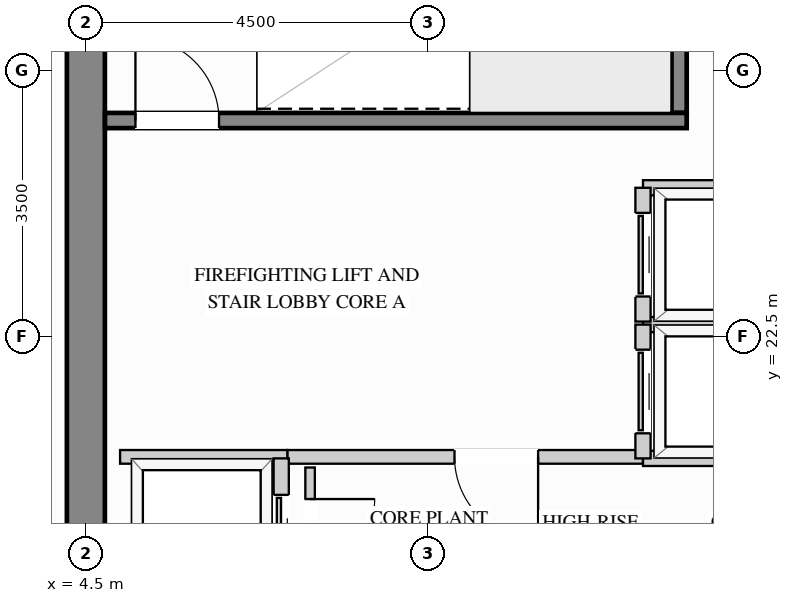
"""IFC4 building model, lengths in metres.
Left out: names, types, materials, properties, quantities, classifications, styles, units other than length and angle.
Written with IfcOpenShell. Run it as: python <this file> out.ifc"""

import sys

from ifc_helpers import new_model, si_unit, direction, frame, frame_2d, origin, place, context, subcontext, project, spatial, rectangle, extrude, source, transform, mapped, element, fill, save


model = new_model("IFC4")
c1 = context("Model", 3, precision=1e-05, world=origin(), true_north=direction((0.0, 1.0)))
c2 = subcontext(c1, "Body", "Model", "MODEL_VIEW")
j1 = project(units=[si_unit("LENGTHUNIT", "METRE"), si_unit("PLANEANGLEUNIT", "RADIAN")], contexts=[c1])
p1 = place(None, origin())
s1 = spatial("IfcSite", under=j1, at=p1, CompositionType="ELEMENT")
p2 = place(p1, origin())
s2 = spatial("IfcBuilding", under=s1, at=p2, CompositionType="ELEMENT")
p3 = place(p2, frame((0.0, 0.0, 230.4)))
s3 = spatial("IfcBuildingStorey", under=s2, at=p3, CompositionType="ELEMENT", Elevation=230.4)
m1 = source(origin(), c2, "Body", "SweptSolid", [
    extrude(rectangle(XDim=20.5, YDim=0.5, at=frame_2d((10.25, 0.0))), origin(), (0.0, 0.0, 1.0), 3.4),
])
p4 = place(p3, frame((4.5, 8.75, 0.0), z_axis=(0.0, 0.0, 1.0), x_axis=(0.0, 1.0, 0.0)))
e1 = element("IfcWall", 1, at=p4, inside=s3, PredefinedType="SHEAR", context=c2, shape_type="MappedRepresentation", body=[
    mapped(m1, transform((0.0, 0.0, 0.0), x_axis=(1.0, 0.0, 0.0), y_axis=(0.0, 1.0, 0.0), z_axis=(0.0, 0.0, 1.0))),
])
p5 = place(p3, frame((7.15, 20.92, 0.0), z_axis=(0.0, 0.0, 1.0), x_axis=(1.0, 0.0, 0.0)))
e2 = element("IfcWall", 2, at=p5, inside=s3, PredefinedType="PARTITIONING", context=c2, shape_type="SweptSolid", body=[
    extrude(rectangle(XDim=4.68, YDim=0.18, at=frame_2d((2.34, 0.0))), origin(), (0.0, 0.0, 1.0), 3.385),
])
p6 = place(p5, frame((2.2, 0.0, 0.0)))
e3 = element("IfcOpeningElement", 3, at=p6, cuts=e2, PredefinedType="OPENING", context=c2, shape_type="SweptSolid", body=[
    extrude(rectangle(XDim=1.1, YDim=2.15, at=frame_2d((0.55, 1.075))), frame((0.0, 0.1, 0.0), z_axis=(0.0, -1.0, 0.0), x_axis=(1.0, 0.0, 0.0)), (0.0, 0.0, 1.0), 0.2),
])
m2 = source(origin(), c2, "Body", "SweptSolid", [
    extrude(rectangle(XDim=2.2, YDim=0.18, at=frame_2d((1.1, 0.0))), origin(), (0.0, 0.0, 1.0), 3.385),
])
p7 = place(p3, frame((4.95, 20.92, 0.0), z_axis=(0.0, 0.0, 1.0), x_axis=(1.0, 0.0, 0.0)))
e4 = element("IfcWall", 4, at=p7, inside=s3, PredefinedType="PARTITIONING", context=c2, shape_type="MappedRepresentation", body=[
    mapped(m2, transform((0.0, 0.0, 0.0), x_axis=(1.0, 0.0, 0.0), y_axis=(0.0, 1.0, 0.0), z_axis=(0.0, 0.0, 1.0))),
])
p8 = place(p3, frame((7.45, 19.2, 0.0), z_axis=(0.0, 0.0, 1.0), x_axis=(0.0, 1.0, 0.0)))
e5 = element("IfcWall", 5, at=p8, inside=s3, PredefinedType="PARTITIONING", context=c2, shape_type="SweptSolid", body=[
    extrude(rectangle(XDim=1.58, YDim=0.125, at=frame_2d((0.79, 0.0))), origin(), (0.0, 0.0, 1.0), 3.385),
])
p9 = place(p8, frame((0.315, 0.0, 0.0)))
e6 = element("IfcOpeningElement", 6, at=p9, cuts=e5, PredefinedType="OPENING", context=c2, shape_type="SweptSolid", body=[
    extrude(rectangle(XDim=0.85, YDim=2.1, at=frame_2d((0.425, 1.05))), frame((0.0, 0.073, 0.0), z_axis=(0.0, -1.0, 0.0), x_axis=(1.0, 0.0, 0.0)), (0.0, 0.0, 1.0), 0.145),
])
m3 = source(origin(), c2, "Body", "SweptSolid", [
    extrude(rectangle(XDim=2.39, YDim=0.2, at=frame_2d((1.195, 0.0))), origin(), (0.0, 0.0, 1.0), 3.385),
])
for number, where, z_axis, x_axis in (
    (7, (11.83, 22.66, 0.0), (0.0, 0.0, 1.0), (1.0, 0.0, 0.0)),
    (8, (11.83, 20.9, 0.0), (0.0, 0.0, 1.0), (1.0, 0.0, 0.0)),
):
    element("IfcWall", number, at=place(p3, frame(where, z_axis=z_axis, x_axis=x_axis)), inside=s3, PredefinedType="PARTITIONING", context=c2, shape_type="MappedRepresentation", body=[
        mapped(m3, transform((0.0, 0.0, 0.0), x_axis=(1.0, 0.0, 0.0), y_axis=(0.0, 1.0, 0.0), z_axis=(0.0, 0.0, 1.0))),
    ])
p10 = place(p3, frame((11.83, 20.9, 0.0), z_axis=(0.0, 0.0, 1.0), x_axis=(0.0, 1.0, 0.0)))
e9 = element("IfcWall", 9, at=p10, inside=s3, PredefinedType="PARTITIONING", context=c2, shape_type="SweptSolid", body=[
    extrude(rectangle(XDim=1.76, YDim=0.2, at=frame_2d((0.88, 0.0))), origin(), (0.0, 0.0, 1.0), 3.385),
])
p11 = place(p10, frame((0.33, 0.0, 0.0)))
e10 = element("IfcOpeningElement", 10, at=p11, cuts=e9, PredefinedType="OPENING", context=c2, shape_type="SweptSolid", body=[
    extrude(rectangle(XDim=1.1, YDim=2.2, at=frame_2d((0.55, 1.1))), frame((0.0, 0.11, 0.0), z_axis=(0.0, -1.0, 0.0), x_axis=(1.0, 0.0, 0.0)), (0.0, 0.0, 1.0), 0.22),
])
p12 = place(p3, frame((11.83, 24.46, 0.0), z_axis=(0.0, 0.0, 1.0), x_axis=(1.0, 0.0, 0.0)))
e11 = element("IfcWall", 11, at=p12, inside=s3, PredefinedType="PARTITIONING", context=c2, shape_type="MappedRepresentation", body=[
    mapped(m3, transform((0.0, 0.0, 0.0), x_axis=(1.0, 0.0, 0.0), y_axis=(0.0, 1.0, 0.0), z_axis=(0.0, 0.0, 1.0))),
])
p13 = place(p3, frame((11.83, 22.7, 0.0), z_axis=(0.0, 0.0, 1.0), x_axis=(0.0, 1.0, 0.0)))
e12 = element("IfcWall", 12, at=p13, inside=s3, PredefinedType="PARTITIONING", context=c2, shape_type="SweptSolid", body=[
    extrude(rectangle(XDim=1.76, YDim=0.2, at=frame_2d((0.88, 0.0))), origin(), (0.0, 0.0, 1.0), 3.385),
])
p14 = place(p13, frame((0.33, 0.0, 0.0)))
e13 = element("IfcOpeningElement", 13, at=p14, cuts=e12, PredefinedType="OPENING", context=c2, shape_type="SweptSolid", body=[
    extrude(rectangle(XDim=1.1, YDim=2.2, at=frame_2d((0.55, 1.1))), frame((0.0, 0.11, 0.0), z_axis=(0.0, -1.0, 0.0), x_axis=(1.0, 0.0, 0.0)), (0.0, 0.0, 1.0), 0.22),
])
p15 = place(p3, frame((7.07, 18.84, 0.0), z_axis=(0.0, 0.0, 1.0), x_axis=(0.0, 1.0, 0.0)))
e14 = element("IfcWall", 14, at=p15, inside=s3, PredefinedType="PARTITIONING", context=c2, shape_type="SweptSolid", body=[
    extrude(rectangle(XDim=2.06, YDim=0.2, at=frame_2d((1.03, 0.0))), origin(), (0.0, 0.0, 1.0), 3.385),
])
p16 = place(p15, frame((0.48, 0.0, 0.0)))
e15 = element("IfcOpeningElement", 15, at=p16, cuts=e14, PredefinedType="OPENING", context=c2, shape_type="SweptSolid", body=[
    extrude(rectangle(XDim=1.1, YDim=2.2, at=frame_2d((0.55, 1.1))), frame((0.0, 0.11, 0.0), z_axis=(0.0, -1.0, 0.0), x_axis=(1.0, 0.0, 0.0)), (0.0, 0.0, 1.0), 0.22),
])
m4 = source(origin(), c2, "Body", "SweptSolid", [
    extrude(rectangle(XDim=3.803, YDim=0.2, at=frame_2d((1.901, 0.0))), origin(), (0.0, 0.0, 1.0), 3.4),
])
p17 = place(p3, frame((12.305, 25.445, 0.0), z_axis=(0.0, 0.0, 1.0), x_axis=(0.0, 1.0, 0.0)))
e16 = element("IfcWall", 16, at=p17, inside=s3, PredefinedType="SHEAR", context=c2, shape_type="MappedRepresentation", body=[
    mapped(m4, transform((0.0, 0.0, 0.0), x_axis=(1.0, 0.0, 0.0), y_axis=(0.0, 1.0, 0.0), z_axis=(0.0, 0.0, 1.0))),
])
p18 = place(p3, frame((4.752, 25.345, 0.0), z_axis=(0.0, 0.0, 1.0), x_axis=(1.0, 0.0, 0.0)))
e17 = element("IfcWall", 17, at=p18, inside=s3, PredefinedType="SHEAR", context=c2, shape_type="SweptSolid", body=[
    extrude(rectangle(XDim=7.653, YDim=0.2, at=frame_2d((3.827, 0.0))), origin(), (0.0, 0.0, 1.0), 3.4),
])
p19 = place(p18, frame((0.4, 0.0, 0.0)))
e18 = element("IfcOpeningElement", 18, at=p19, cuts=e17, PredefinedType="OPENING", context=c2, shape_type="SweptSolid", body=[
    extrude(rectangle(XDim=1.1, YDim=2.15, at=frame_2d((0.55, 1.075))), frame((0.0, 0.11, 0.0), z_axis=(0.0, -1.0, 0.0), x_axis=(1.0, 0.0, 0.0)), (0.0, 0.0, 1.0), 0.22),
])
m5 = source(origin(), c2, "Body", "SweptSolid", [
    extrude(rectangle(XDim=1.1, YDim=2.15, at=frame_2d((0.55, 1.075))), frame((0.0, 0.025, 0.0), z_axis=(0.0, -1.0, 0.0), x_axis=(1.0, 0.0, 0.0)), (0.0, 0.0, 1.0), 0.05),
])
p20 = place(p6, origin())
e19 = element("IfcDoor", 19, at=p20, inside=s3, OperationType="SINGLE_SWING_RIGHT", PredefinedType="DOOR", context=c2, shape_type="MappedRepresentation", body=[
    mapped(m5, transform((0.0, 0.0, 0.0), x_axis=(1.0, 0.0, 0.0), y_axis=(0.0, 1.0, 0.0), z_axis=(0.0, 0.0, 1.0))),
])
fill(e3, e19)
m6 = source(origin(), c2, "Body", "SweptSolid", [
    extrude(rectangle(XDim=1.1, YDim=2.2, at=frame_2d((0.55, 1.1))), frame((0.0, 0.025, 0.0), z_axis=(0.0, -1.0, 0.0), x_axis=(1.0, 0.0, 0.0)), (0.0, 0.0, 1.0), 0.05),
])
p21 = place(p11, origin())
e20 = element("IfcDoor", 20, at=p21, inside=s3, OperationType="SLIDING_TO_LEFT", PredefinedType="DOOR", context=c2, shape_type="MappedRepresentation", body=[
    mapped(m6, transform((0.0, 0.0, 0.0), x_axis=(1.0, 0.0, 0.0), y_axis=(0.0, 1.0, 0.0), z_axis=(0.0, 0.0, 1.0))),
])
fill(e10, e20)
p22 = place(p14, origin())
e21 = element("IfcDoor", 21, at=p22, inside=s3, OperationType="SLIDING_TO_LEFT", PredefinedType="DOOR", context=c2, shape_type="MappedRepresentation", body=[
    mapped(m6, transform((0.0, 0.0, 0.0), x_axis=(1.0, 0.0, 0.0), y_axis=(0.0, 1.0, 0.0), z_axis=(0.0, 0.0, 1.0))),
])
fill(e13, e21)
p23 = place(p16, origin())
e22 = element("IfcDoor", 22, at=p23, inside=s3, OperationType="SLIDING_TO_LEFT", PredefinedType="DOOR", context=c2, shape_type="MappedRepresentation", body=[
    mapped(m6, transform((0.0, 0.0, 0.0), x_axis=(1.0, 0.0, 0.0), y_axis=(0.0, 1.0, 0.0), z_axis=(0.0, 0.0, 1.0))),
])
fill(e15, e22)
m7 = source(origin(), c2, "Body", "SweptSolid", [
    extrude(rectangle(XDim=0.85, YDim=2.1, at=frame_2d((0.425, 1.05))), frame((0.0, 0.025, 0.0), z_axis=(0.0, -1.0, 0.0), x_axis=(1.0, 0.0, 0.0)), (0.0, 0.0, 1.0), 0.05),
])
p24 = place(p9, origin())
e23 = element("IfcDoor", 23, at=p24, inside=s3, OperationType="SINGLE_SWING_RIGHT", PredefinedType="DOOR", context=c2, shape_type="MappedRepresentation", body=[
    mapped(m7, transform((0.0, 0.0, 0.0), x_axis=(1.0, 0.0, 0.0), y_axis=(0.0, 1.0, 0.0), z_axis=(0.0, 0.0, 1.0))),
])
fill(e6, e23)
m8 = source(origin(), c2, "Body", "SweptSolid", [
    extrude(rectangle(XDim=1.1, YDim=2.15, at=frame_2d((0.55, 1.075))), frame((0.0, 0.025, 0.0), z_axis=(0.0, -1.0, 0.0), x_axis=(1.0, 0.0, 0.0)), (0.0, 0.0, 1.0), 0.05),
])
p25 = place(p19, origin())
e24 = element("IfcDoor", 24, at=p25, inside=s3, OperationType="SINGLE_SWING_LEFT", PredefinedType="DOOR", context=c2, shape_type="MappedRepresentation", body=[
    mapped(m8, transform((0.0, 0.0, 0.0), x_axis=(1.0, 0.0, 0.0), y_axis=(0.0, 1.0, 0.0), z_axis=(0.0, 0.0, 1.0))),
])
fill(e18, e24)
save(model, sys.argv[1])
